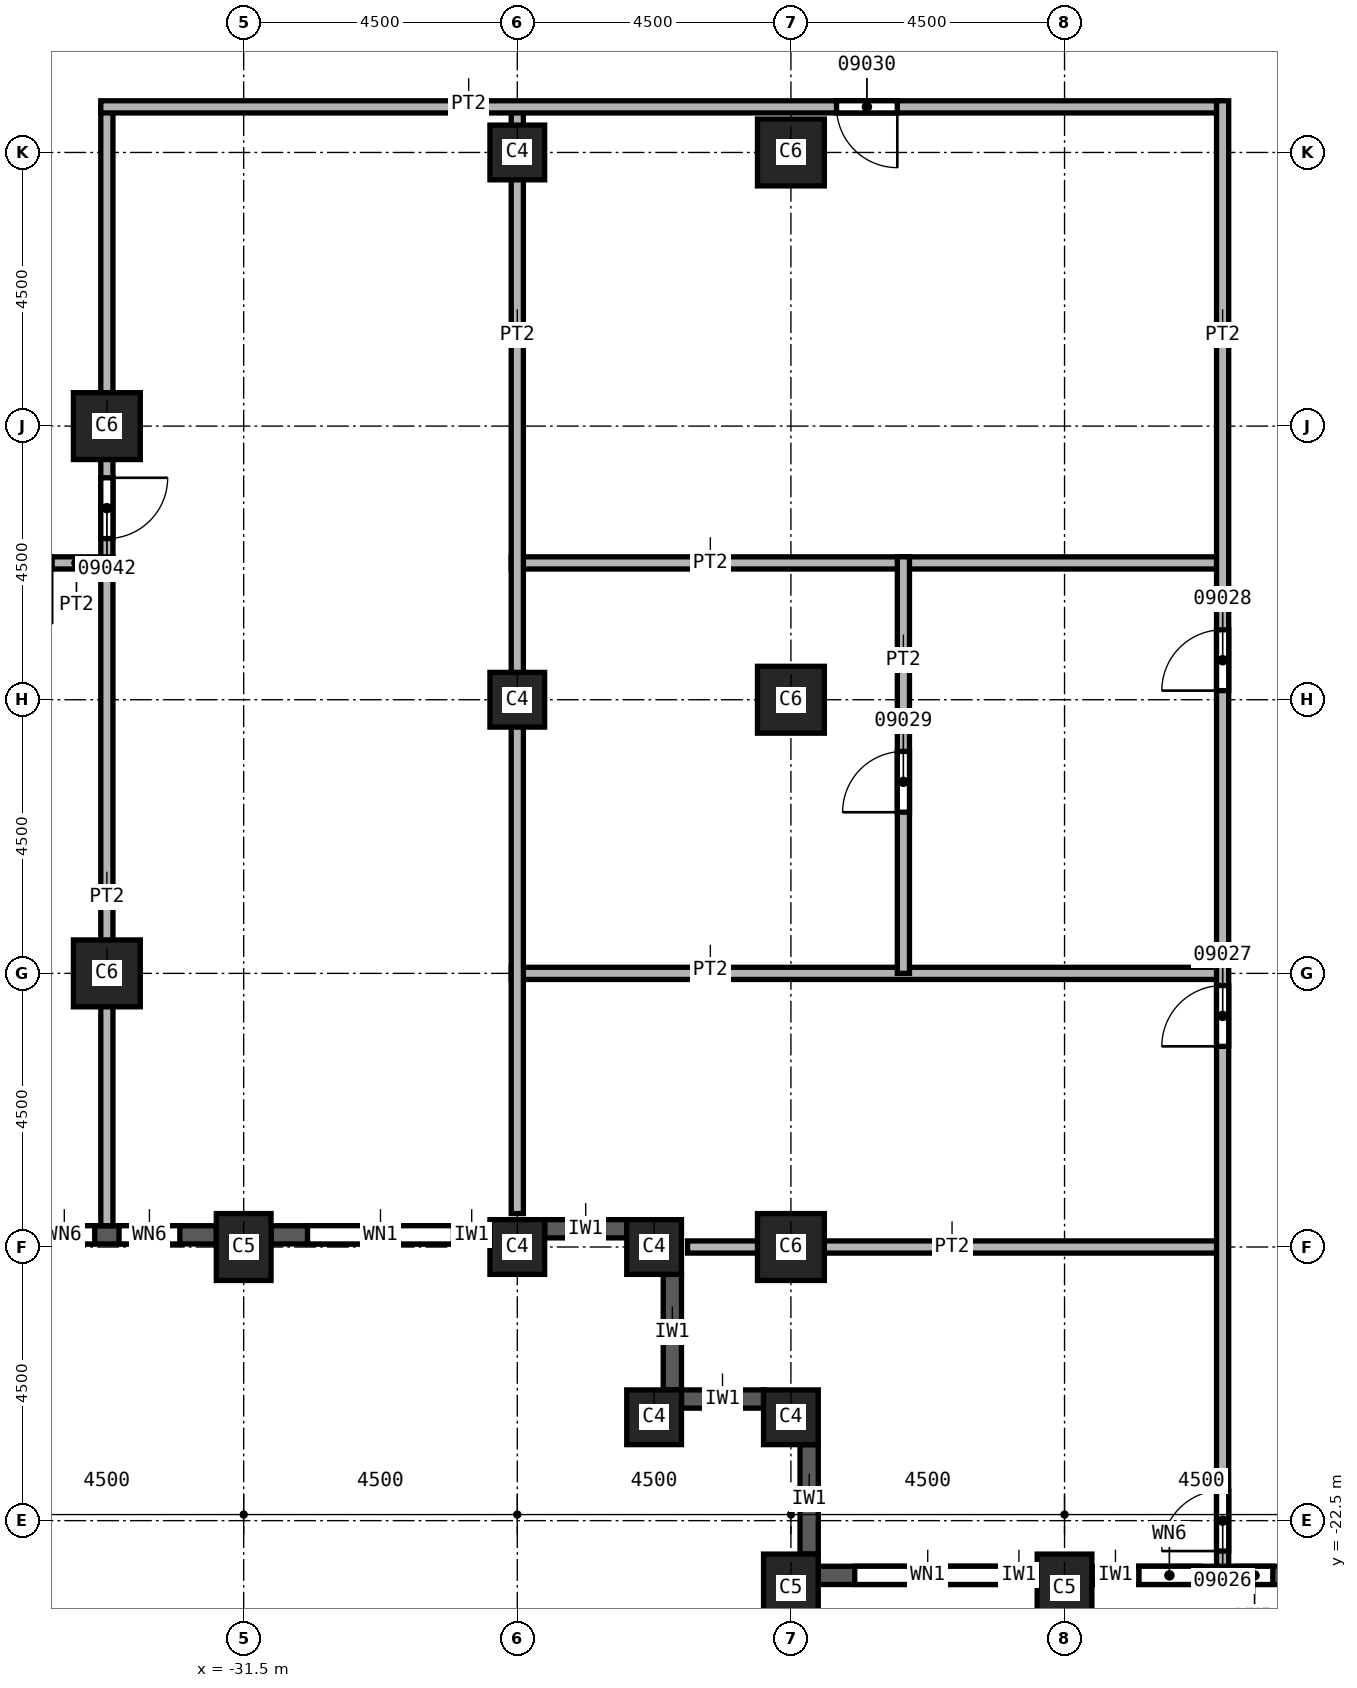
"""IFC4 building model, lengths in metres.
Left out: names, types, materials, properties, quantities, classifications, styles, units other than length and angle.
Written with IfcOpenShell. Run it as: python <this file> out.ifc"""

import sys

from ifc_helpers import new_model, si_unit, direction, frame, frame_2d, origin, origin_2d, place, context, subcontext, project, spatial, rectangle, extrude, element, fill, save


model = new_model("IFC4")
c1 = context("Model", 3, precision=1e-05, world=origin(), true_north=direction((0.0, 1.0)))
c2 = subcontext(c1, "Body", "Model", "MODEL_VIEW")
j1 = project(units=[si_unit("LENGTHUNIT", "METRE"), si_unit("PLANEANGLEUNIT", "RADIAN")], contexts=[c1])
p1 = place(None, origin())
s1 = spatial("IfcSite", under=j1, at=p1, CompositionType="ELEMENT")
p2 = place(p1, origin())
s2 = spatial("IfcBuilding", under=s1, at=p2, CompositionType="ELEMENT")
p3 = place(p2, frame((0.0, 0.0, 162.0)))
s3 = spatial("IfcBuildingStorey", under=s2, at=p3, CompositionType="ELEMENT", Elevation=162.0)
p4 = place(p3, frame((-31.5, -18.0, 0.0), z_axis=(0.0, 0.0, 1.0), x_axis=(1.0, 0.0, 0.0)))
e1 = element("IfcColumn", 1, at=p4, inside=s3, PredefinedType="COLUMN", context=c2, shape_type="SweptSolid", body=[
    extrude(rectangle(XDim=0.9, YDim=1.1, at=origin_2d()), origin(), (0.0, 0.0, 1.0), 3.7),
])
for number, where, z_axis, x_axis in (
    (2, (-33.75, -4.5, 0.0), (0.0, 0.0, 1.0), (1.0, 0.0, 0.0)),
    (3, (-33.75, -13.5, 0.0), (0.0, 0.0, 1.0), (1.0, 0.0, 0.0)),
    (4, (-22.5, 0.0, 0.0), (0.0, 0.0, 1.0), (1.0, 0.0, 0.0)),
    (5, (-22.5, -9.0, 0.0), (0.0, 0.0, 1.0), (1.0, 0.0, 0.0)),
    (6, (-22.5, -18.0, 0.0), (0.0, 0.0, 1.0), (1.0, 0.0, 0.0)),
):
    element("IfcColumn", number, at=place(p3, frame(where, z_axis=z_axis, x_axis=x_axis)), inside=s3, PredefinedType="COLUMN", context=c2, shape_type="SweptSolid", body=[
        extrude(rectangle(XDim=1.1, YDim=1.1, at=origin_2d()), origin(), (0.0, 0.0, 1.0), 3.7),
    ])
for number, where, z_axis, x_axis in (
    (7, (-18.0, -23.6, 0.0), (0.0, 0.0, 1.0), (1.0, 0.0, 0.0)),
    (8, (-22.5, -23.6, 0.0), (0.0, 0.0, 1.0), (1.0, 0.0, 0.0)),
):
    element("IfcColumn", number, at=place(p3, frame(where, z_axis=z_axis, x_axis=x_axis)), inside=s3, PredefinedType="COLUMN", context=c2, shape_type="SweptSolid", body=[
        extrude(rectangle(XDim=0.9, YDim=1.1, at=origin_2d()), origin(), (0.0, 0.0, 1.0), 3.7),
    ])
for number, where, z_axis, x_axis in (
    (9, (-27.0, 0.0, 0.0), (0.0, 0.0, 1.0), (1.0, 0.0, 0.0)),
    (10, (-27.0, -9.0, 0.0), (0.0, 0.0, 1.0), (1.0, 0.0, 0.0)),
    (11, (-27.0, -18.0, 0.0), (0.0, 0.0, 1.0), (1.0, 0.0, 0.0)),
    (12, (-22.5, -20.8, 0.0), (0.0, 0.0, 1.0), (1.0, 0.0, 0.0)),
    (13, (-24.75, -20.8, 0.0), (0.0, 0.0, 1.0), (1.0, 0.0, 0.0)),
    (14, (-24.75, -18.0, 0.0), (0.0, 0.0, 1.0), (1.0, 0.0, 0.0)),
):
    element("IfcColumn", number, at=place(p3, frame(where, z_axis=z_axis, x_axis=x_axis)), inside=s3, PredefinedType="COLUMN", context=c2, shape_type="SweptSolid", body=[
        extrude(rectangle(XDim=0.9, YDim=0.9, at=origin_2d()), origin(), (0.0, 0.0, 1.0), 3.7),
    ])
p5 = place(p3, frame((-35.55, -17.8, 0.0), z_axis=(0.0, 0.0, 1.0), x_axis=(1.0, 0.0, 0.0)))
e15 = element("IfcWall", 15, at=p5, inside=s3, PredefinedType="SOLIDWALL", context=c2, shape_type="SweptSolid", body=[
    extrude(rectangle(XDim=3.6, YDim=0.3, at=frame_2d((1.8, 0.0))), origin(), (0.0, 0.0, 1.0), 3.1),
])
p6 = place(p5, frame((0.6, 0.0, 0.8)))
e16 = element("IfcOpeningElement", 16, at=p6, cuts=e15, PredefinedType="OPENING", context=c2, shape_type="SweptSolid", body=[
    extrude(rectangle(XDim=1.0, YDim=1.95, at=frame_2d((0.5, 0.975))), frame((0.0, 0.15, 0.0), z_axis=(0.0, -1.0, 0.0), x_axis=(1.0, 0.0, 0.0)), (0.0, 0.0, 1.0), 0.3),
])
p7 = place(p5, frame((2.0, 0.0, 0.8)))
e17 = element("IfcOpeningElement", 17, at=p7, cuts=e15, PredefinedType="OPENING", context=c2, shape_type="SweptSolid", body=[
    extrude(rectangle(XDim=1.0, YDim=1.95, at=frame_2d((0.5, 0.975))), frame((0.0, 0.15, 0.0), z_axis=(0.0, -1.0, 0.0), x_axis=(1.0, 0.0, 0.0)), (0.0, 0.0, 1.0), 0.3),
])
p8 = place(p3, frame((-31.05, -17.8, 0.0), z_axis=(0.0, 0.0, 1.0), x_axis=(1.0, 0.0, 0.0)))
e18 = element("IfcWall", 18, at=p8, inside=s3, PredefinedType="SOLIDWALL", context=c2, shape_type="SweptSolid", body=[
    extrude(rectangle(XDim=3.6, YDim=0.3, at=frame_2d((1.8, 0.0))), origin(), (0.0, 0.0, 1.0), 3.1),
])
p9 = place(p8, frame((0.6, 0.0, 0.8)))
e19 = element("IfcOpeningElement", 19, at=p9, cuts=e18, PredefinedType="OPENING", context=c2, shape_type="SweptSolid", body=[
    extrude(rectangle(XDim=2.4, YDim=1.95, at=frame_2d((1.2, 0.975))), frame((0.0, 0.15, 0.0), z_axis=(0.0, -1.0, 0.0), x_axis=(1.0, 0.0, 0.0)), (0.0, 0.0, 1.0), 0.3),
])
p10 = place(p3, frame((-26.55, -17.7, 0.0), z_axis=(0.0, 0.0, 1.0), x_axis=(1.0, 0.0, 0.0)))
e20 = element("IfcWall", 20, at=p10, inside=s3, PredefinedType="SOLIDWALL", context=c2, shape_type="SweptSolid", body=[
    extrude(rectangle(XDim=1.35, YDim=0.3, at=frame_2d((0.675, 0.0))), origin(), (0.0, 0.0, 1.0), 3.1),
])
p11 = place(p3, frame((-24.45, -18.45, 0.0), z_axis=(0.0, 0.0, 1.0), x_axis=(0.0, -1.0, 0.0)))
e21 = element("IfcWall", 21, at=p11, inside=s3, PredefinedType="SOLIDWALL", context=c2, shape_type="SweptSolid", body=[
    extrude(rectangle(XDim=1.9, YDim=0.3, at=frame_2d((0.95, 0.0))), origin(), (0.0, 0.0, 1.0), 3.1),
])
p12 = place(p3, frame((-24.3, -20.5, 0.0), z_axis=(0.0, 0.0, 1.0), x_axis=(1.0, 0.0, 0.0)))
e22 = element("IfcWall", 22, at=p12, inside=s3, PredefinedType="SOLIDWALL", context=c2, shape_type="SweptSolid", body=[
    extrude(rectangle(XDim=1.35, YDim=0.3, at=frame_2d((0.675, 0.0))), origin(), (0.0, 0.0, 1.0), 3.1),
])
p13 = place(p3, frame((-22.2, -21.25, 0.0), z_axis=(0.0, 0.0, 1.0), x_axis=(0.0, -1.0, 0.0)))
e23 = element("IfcWall", 23, at=p13, inside=s3, PredefinedType="SOLIDWALL", context=c2, shape_type="SweptSolid", body=[
    extrude(rectangle(XDim=1.8, YDim=0.3, at=frame_2d((0.9, 0.0))), origin(), (0.0, 0.0, 1.0), 3.1),
])
p14 = place(p3, frame((-22.05, -23.4, 0.0), z_axis=(0.0, 0.0, 1.0), x_axis=(1.0, 0.0, 0.0)))
e24 = element("IfcWall", 24, at=p14, inside=s3, PredefinedType="SOLIDWALL", context=c2, shape_type="SweptSolid", body=[
    extrude(rectangle(XDim=3.6, YDim=0.3, at=frame_2d((1.8, 0.0))), origin(), (0.0, 0.0, 1.0), 3.1),
])
p15 = place(p14, frame((0.6, 0.0, 0.8)))
e25 = element("IfcOpeningElement", 25, at=p15, cuts=e24, PredefinedType="OPENING", context=c2, shape_type="SweptSolid", body=[
    extrude(rectangle(XDim=2.4, YDim=1.95, at=frame_2d((1.2, 0.975))), frame((0.0, 0.15, 0.0), z_axis=(0.0, -1.0, 0.0), x_axis=(1.0, 0.0, 0.0)), (0.0, 0.0, 1.0), 0.3),
])
p16 = place(p3, frame((-17.55, -23.4, 0.0), z_axis=(0.0, 0.0, 1.0), x_axis=(1.0, 0.0, 0.0)))
e26 = element("IfcWall", 26, at=p16, inside=s3, PredefinedType="SOLIDWALL", context=c2, shape_type="SweptSolid", body=[
    extrude(rectangle(XDim=3.6, YDim=0.3, at=frame_2d((1.8, 0.0))), origin(), (0.0, 0.0, 1.0), 3.1),
])
p17 = place(p16, frame((0.775, 0.0, 0.8)))
e27 = element("IfcOpeningElement", 27, at=p17, cuts=e26, PredefinedType="OPENING", context=c2, shape_type="SweptSolid", body=[
    extrude(rectangle(XDim=1.0, YDim=1.95, at=frame_2d((0.5, 0.975))), frame((0.0, 0.15, 0.0), z_axis=(0.0, -1.0, 0.0), x_axis=(1.0, 0.0, 0.0)), (0.0, 0.0, 1.0), 0.3),
])
p18 = place(p16, frame((2.375, 0.0, 0.8)))
e28 = element("IfcOpeningElement", 28, at=p18, cuts=e26, PredefinedType="OPENING", context=c2, shape_type="SweptSolid", body=[
    extrude(rectangle(XDim=0.6, YDim=1.95, at=frame_2d((0.3, 0.975))), frame((0.0, 0.15, 0.0), z_axis=(0.0, -1.0, 0.0), x_axis=(1.0, 0.0, 0.0)), (0.0, 0.0, 1.0), 0.3),
])
p19 = place(p3, frame((-33.75, 0.75, 0.0), z_axis=(0.0, 0.0, 1.0), x_axis=(0.0, -1.0, 0.0)))
e29 = element("IfcWall", 29, at=p19, inside=s3, PredefinedType="PARTITIONING", context=c2, shape_type="SweptSolid", body=[
    extrude(rectangle(XDim=18.4, YDim=0.2, at=frame_2d((9.2, 0.0))), origin(), (0.0, 0.0, 1.0), 3.7),
])
p20 = place(p19, frame((6.1, 0.0, 0.0)))
e30 = element("IfcOpeningElement", 30, at=p20, cuts=e29, PredefinedType="OPENING", context=c2, shape_type="SweptSolid", body=[
    extrude(rectangle(XDim=1.0, YDim=2.1, at=frame_2d((0.5, 1.05))), frame((0.0, 0.1, 0.0), z_axis=(0.0, -1.0, 0.0), x_axis=(1.0, 0.0, 0.0)), (0.0, 0.0, 1.0), 0.2),
])
p21 = place(p3, frame((-33.65, -6.75, 0.0), z_axis=(0.0, 0.0, 1.0), x_axis=(-1.0, 0.0, 0.0)))
e31 = element("IfcWall", 31, at=p21, inside=s3, PredefinedType="PARTITIONING", context=c2, shape_type="SweptSolid", body=[
    extrude(rectangle(XDim=2.35, YDim=0.2, at=frame_2d((1.175, 0.0))), origin(), (0.0, 0.0, 1.0), 3.7),
])
p22 = place(p21, frame((1.0, 0.0, 0.0)))
e32 = element("IfcOpeningElement", 32, at=p22, cuts=e31, PredefinedType="OPENING", context=c2, shape_type="SweptSolid", body=[
    extrude(rectangle(XDim=1.0, YDim=2.1, at=frame_2d((0.5, 1.05))), frame((0.0, 0.1, 0.0), z_axis=(0.0, -1.0, 0.0), x_axis=(1.0, 0.0, 0.0)), (0.0, 0.0, 1.0), 0.2),
])
for number, where, z_axis, x_axis in (
    (33, (-27.1, -13.5, 0.0), (0.0, 0.0, 1.0), (1.0, 0.0, 0.0)),
    (34, (-27.1, -6.75, 0.0), (0.0, 0.0, 1.0), (1.0, 0.0, 0.0)),
):
    element("IfcWall", number, at=place(p3, frame(where, z_axis=z_axis, x_axis=x_axis)), inside=s3, PredefinedType="PARTITIONING", context=c2, shape_type="SweptSolid", body=[
        extrude(rectangle(XDim=11.7, YDim=0.2, at=frame_2d((5.85, 0.0))), origin(), (0.0, 0.0, 1.0), 3.7),
    ])
p23 = place(p3, frame((-27.0, -17.45, 0.0), z_axis=(0.0, 0.0, 1.0), x_axis=(0.0, 1.0, 0.0)))
e35 = element("IfcWall", 35, at=p23, inside=s3, PredefinedType="PARTITIONING", context=c2, shape_type="SweptSolid", body=[
    extrude(rectangle(XDim=18.2, YDim=0.2, at=frame_2d((9.1, 0.0))), origin(), (0.0, 0.0, 1.0), 3.7),
])
p24 = place(p3, frame((-15.4, 0.75, 0.0), z_axis=(0.0, 0.0, 1.0), x_axis=(-1.0, 0.0, 0.0)))
e36 = element("IfcWall", 36, at=p24, inside=s3, PredefinedType="PARTITIONING", context=c2, shape_type="SweptSolid", body=[
    extrude(rectangle(XDim=18.45, YDim=0.2, at=frame_2d((9.225, 0.0))), origin(), (0.0, 0.0, 1.0), 3.7),
])
p25 = place(p24, frame((5.35, 0.0, 0.0)))
e37 = element("IfcOpeningElement", 37, at=p25, cuts=e36, PredefinedType="OPENING", context=c2, shape_type="SweptSolid", body=[
    extrude(rectangle(XDim=1.0, YDim=2.1, at=frame_2d((0.5, 1.05))), frame((0.0, 0.1, 0.0), z_axis=(0.0, -1.0, 0.0), x_axis=(1.0, 0.0, 0.0)), (0.0, 0.0, 1.0), 0.2),
])
p26 = place(p3, frame((-24.2, -18.0, 0.0), z_axis=(0.0, 0.0, 1.0), x_axis=(1.0, 0.0, 0.0)))
e38 = element("IfcWall", 38, at=p26, inside=s3, PredefinedType="PARTITIONING", context=c2, shape_type="SweptSolid", body=[
    extrude(rectangle(XDim=8.8, YDim=0.2, at=frame_2d((4.4, 0.0))), origin(), (0.0, 0.0, 1.0), 3.7),
])
p27 = place(p3, frame((-20.65, -13.5, 0.0), z_axis=(0.0, 0.0, 1.0), x_axis=(0.0, 1.0, 0.0)))
e39 = element("IfcWall", 39, at=p27, inside=s3, PredefinedType="PARTITIONING", context=c2, shape_type="SweptSolid", body=[
    extrude(rectangle(XDim=6.85, YDim=0.2, at=frame_2d((3.425, 0.0))), origin(), (0.0, 0.0, 1.0), 3.7),
])
p28 = place(p27, frame((2.65, 0.0, 0.0)))
e40 = element("IfcOpeningElement", 40, at=p28, cuts=e39, PredefinedType="OPENING", context=c2, shape_type="SweptSolid", body=[
    extrude(rectangle(XDim=1.0, YDim=2.1, at=frame_2d((0.5, 1.05))), frame((0.0, 0.1, 0.0), z_axis=(0.0, -1.0, 0.0), x_axis=(1.0, 0.0, 0.0)), (0.0, 0.0, 1.0), 0.2),
])
p29 = place(p3, frame((-15.4, -23.25, 0.0), z_axis=(0.0, 0.0, 1.0), x_axis=(0.0, 1.0, 0.0)))
e41 = element("IfcWall", 41, at=p29, inside=s3, PredefinedType="PARTITIONING", context=c2, shape_type="SweptSolid", body=[
    extrude(rectangle(XDim=24.1, YDim=0.2, at=frame_2d((12.05, 0.0))), origin(), (0.0, 0.0, 1.0), 3.7),
])
p30 = place(p29, frame((0.25, 0.0, 0.0)))
e42 = element("IfcOpeningElement", 42, at=p30, cuts=e41, PredefinedType="OPENING", context=c2, shape_type="SweptSolid", body=[
    extrude(rectangle(XDim=1.0, YDim=2.1, at=frame_2d((0.5, 1.05))), frame((0.0, 0.1, 0.0), z_axis=(0.0, -1.0, 0.0), x_axis=(1.0, 0.0, 0.0)), (0.0, 0.0, 1.0), 0.2),
])
p31 = place(p29, frame((8.55, 0.0, 0.0)))
e43 = element("IfcOpeningElement", 43, at=p31, cuts=e41, PredefinedType="OPENING", context=c2, shape_type="SweptSolid", body=[
    extrude(rectangle(XDim=1.0, YDim=2.1, at=frame_2d((0.5, 1.05))), frame((0.0, 0.1, 0.0), z_axis=(0.0, -1.0, 0.0), x_axis=(1.0, 0.0, 0.0)), (0.0, 0.0, 1.0), 0.2),
])
p32 = place(p29, frame((14.4, 0.0, 0.0)))
e44 = element("IfcOpeningElement", 44, at=p32, cuts=e41, PredefinedType="OPENING", context=c2, shape_type="SweptSolid", body=[
    extrude(rectangle(XDim=1.0, YDim=2.1, at=frame_2d((0.5, 1.05))), frame((0.0, 0.1, 0.0), z_axis=(0.0, -1.0, 0.0), x_axis=(1.0, 0.0, 0.0)), (0.0, 0.0, 1.0), 0.2),
])
p33 = place(p9, origin())
e45 = element("IfcWindow", 45, at=p33, inside=s3, PartitioningType="SINGLE_PANEL", PredefinedType="WINDOW", context=c2, shape_type="SweptSolid", body=[
    extrude(rectangle(XDim=2.4, YDim=1.95, at=frame_2d((1.2, 0.975))), frame((0.0, 0.03, 0.0), z_axis=(0.0, -1.0, 0.0), x_axis=(1.0, 0.0, 0.0)), (0.0, 0.0, 1.0), 0.06),
])
fill(e19, e45)
p34 = place(p15, origin())
e46 = element("IfcWindow", 46, at=p34, inside=s3, PartitioningType="SINGLE_PANEL", PredefinedType="WINDOW", context=c2, shape_type="SweptSolid", body=[
    extrude(rectangle(XDim=2.4, YDim=1.95, at=frame_2d((1.2, 0.975))), frame((0.0, 0.03, 0.0), z_axis=(0.0, -1.0, 0.0), x_axis=(1.0, 0.0, 0.0)), (0.0, 0.0, 1.0), 0.06),
])
fill(e25, e46)
p35 = place(p30, origin())
e47 = element("IfcDoor", 47, at=p35, inside=s3, OperationType="SINGLE_SWING_LEFT", PredefinedType="DOOR", context=c2, shape_type="SweptSolid", body=[
    extrude(rectangle(XDim=1.0, YDim=2.1, at=frame_2d((0.5, 1.05))), frame((0.0, 0.025, 0.0), z_axis=(0.0, -1.0, 0.0), x_axis=(1.0, 0.0, 0.0)), (0.0, 0.0, 1.0), 0.05),
])
fill(e42, e47)
p36 = place(p31, origin())
e48 = element("IfcDoor", 48, at=p36, inside=s3, OperationType="SINGLE_SWING_RIGHT", PredefinedType="DOOR", context=c2, shape_type="SweptSolid", body=[
    extrude(rectangle(XDim=1.0, YDim=2.1, at=frame_2d((0.5, 1.05))), frame((0.0, 0.025, 0.0), z_axis=(0.0, -1.0, 0.0), x_axis=(1.0, 0.0, 0.0)), (0.0, 0.0, 1.0), 0.05),
])
fill(e43, e48)
p37 = place(p32, origin())
e49 = element("IfcDoor", 49, at=p37, inside=s3, OperationType="SINGLE_SWING_LEFT", PredefinedType="DOOR", context=c2, shape_type="SweptSolid", body=[
    extrude(rectangle(XDim=1.0, YDim=2.1, at=frame_2d((0.5, 1.05))), frame((0.0, 0.025, 0.0), z_axis=(0.0, -1.0, 0.0), x_axis=(1.0, 0.0, 0.0)), (0.0, 0.0, 1.0), 0.05),
])
fill(e44, e49)
p38 = place(p28, origin())
e50 = element("IfcDoor", 50, at=p38, inside=s3, OperationType="SINGLE_SWING_RIGHT", PredefinedType="DOOR", context=c2, shape_type="SweptSolid", body=[
    extrude(rectangle(XDim=1.0, YDim=2.1, at=frame_2d((0.5, 1.05))), frame((0.0, 0.025, 0.0), z_axis=(0.0, -1.0, 0.0), x_axis=(1.0, 0.0, 0.0)), (0.0, 0.0, 1.0), 0.05),
])
fill(e40, e50)
p39 = place(p25, origin())
e51 = element("IfcDoor", 51, at=p39, inside=s3, OperationType="SINGLE_SWING_LEFT", PredefinedType="DOOR", context=c2, shape_type="SweptSolid", body=[
    extrude(rectangle(XDim=1.0, YDim=2.1, at=frame_2d((0.5, 1.05))), frame((0.0, 0.025, 0.0), z_axis=(0.0, -1.0, 0.0), x_axis=(1.0, 0.0, 0.0)), (0.0, 0.0, 1.0), 0.05),
])
fill(e37, e51)
p40 = place(p20, origin())
e52 = element("IfcDoor", 52, at=p40, inside=s3, OperationType="SINGLE_SWING_LEFT", PredefinedType="DOOR", context=c2, shape_type="SweptSolid", body=[
    extrude(rectangle(XDim=1.0, YDim=2.1, at=frame_2d((0.5, 1.05))), frame((0.0, 0.025, 0.0), z_axis=(0.0, -1.0, 0.0), x_axis=(1.0, 0.0, 0.0)), (0.0, 0.0, 1.0), 0.05),
])
fill(e30, e52)
p41 = place(p6, origin())
e53 = element("IfcWindow", 53, at=p41, inside=s3, PartitioningType="SINGLE_PANEL", PredefinedType="WINDOW", context=c2, shape_type="SweptSolid", body=[
    extrude(rectangle(XDim=1.0, YDim=1.95, at=frame_2d((0.5, 0.975))), frame((0.0, 0.03, 0.0), z_axis=(0.0, -1.0, 0.0), x_axis=(1.0, 0.0, 0.0)), (0.0, 0.0, 1.0), 0.06),
])
fill(e16, e53)
p42 = place(p7, origin())
e54 = element("IfcWindow", 54, at=p42, inside=s3, PartitioningType="SINGLE_PANEL", PredefinedType="WINDOW", context=c2, shape_type="SweptSolid", body=[
    extrude(rectangle(XDim=1.0, YDim=1.95, at=frame_2d((0.5, 0.975))), frame((0.0, 0.03, 0.0), z_axis=(0.0, -1.0, 0.0), x_axis=(1.0, 0.0, 0.0)), (0.0, 0.0, 1.0), 0.06),
])
fill(e17, e54)
p43 = place(p17, origin())
e55 = element("IfcWindow", 55, at=p43, inside=s3, PartitioningType="SINGLE_PANEL", PredefinedType="WINDOW", context=c2, shape_type="SweptSolid", body=[
    extrude(rectangle(XDim=1.0, YDim=1.95, at=frame_2d((0.5, 0.975))), frame((0.0, 0.03, 0.0), z_axis=(0.0, -1.0, 0.0), x_axis=(1.0, 0.0, 0.0)), (0.0, 0.0, 1.0), 0.06),
])
fill(e27, e55)
p44 = place(p18, origin())
e56 = element("IfcWindow", 56, at=p44, inside=s3, PartitioningType="SINGLE_PANEL", PredefinedType="WINDOW", context=c2, shape_type="SweptSolid", body=[
    extrude(rectangle(XDim=0.6, YDim=1.95, at=frame_2d((0.3, 0.975))), frame((0.0, 0.03, 0.0), z_axis=(0.0, -1.0, 0.0), x_axis=(1.0, 0.0, 0.0)), (0.0, 0.0, 1.0), 0.06),
])
fill(e28, e56)
save(model, sys.argv[1])
